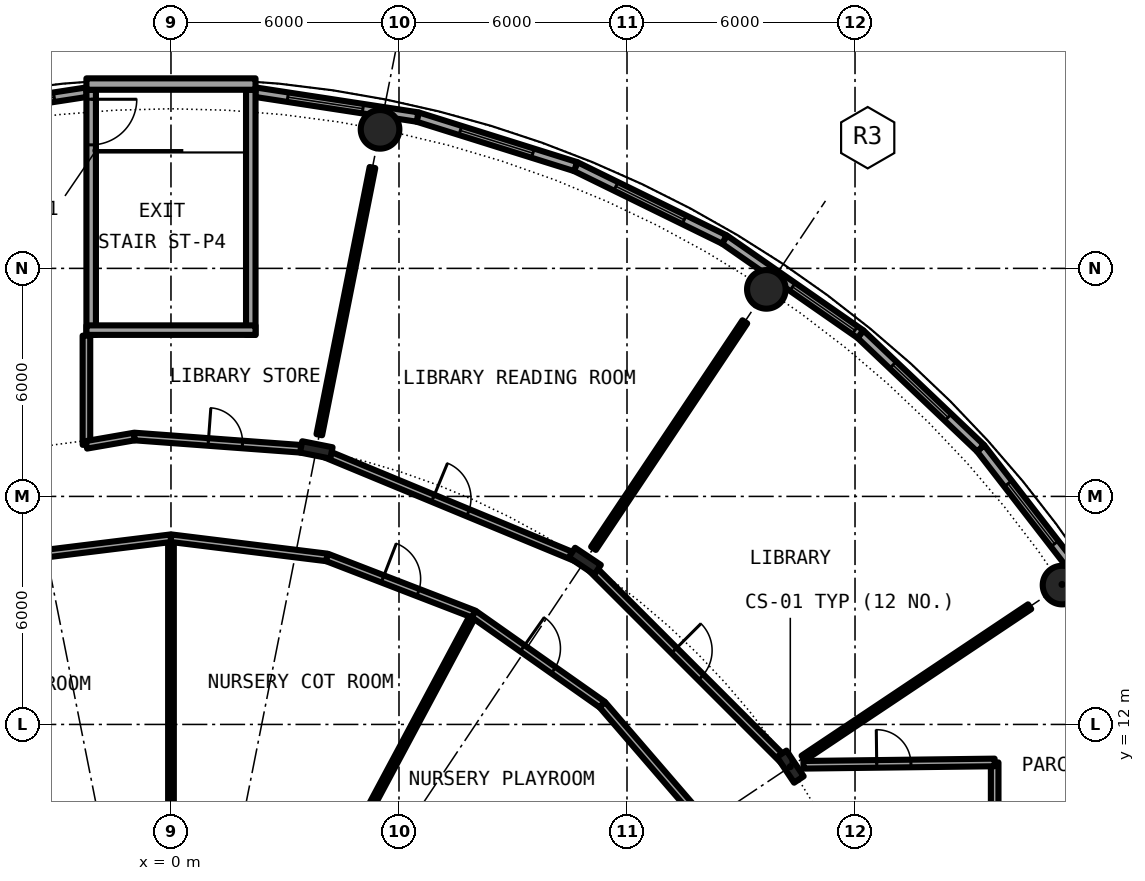
"""IFC4 building model, lengths in metres.
Left out: names, types, materials, properties, quantities, classifications, styles, units other than length and angle.
Written with IfcOpenShell. Run it as: python <this file> out.ifc"""

import sys

from ifc_helpers import new_model, si_unit, direction, frame, frame_2d, origin, origin_2d, place, context, subcontext, project, spatial, rectangle, hollow_circle, i_section, extrude, element, fill, save


model = new_model("IFC4")
c1 = context("Model", 3, precision=1e-05, world=origin(), true_north=direction((0.0, 1.0)))
c2 = subcontext(c1, "Body", "Model", "MODEL_VIEW")
j1 = project(units=[si_unit("LENGTHUNIT", "METRE"), si_unit("PLANEANGLEUNIT", "RADIAN")], contexts=[c1])
p1 = place(None, origin())
s1 = spatial("IfcSite", under=j1, at=p1, CompositionType="ELEMENT")
p2 = place(p1, origin())
s2 = spatial("IfcBuilding", under=s1, at=p2, CompositionType="ELEMENT")
p3 = place(p2, frame((0.0, 0.0, 14.1)))
s3 = spatial("IfcBuildingStorey", under=s2, at=p3, CompositionType="ELEMENT", Elevation=14.1)
for number, where, z_axis, x_axis in (
    (1, (23.448, 15.667, 0.0), (0.0, 0.0, 1.0), (1.0, 0.0, 0.0)),
    (2, (15.667, 23.448, 0.0), (0.0, 0.0, 1.0), (1.0, 0.0, 0.0)),
    (3, (5.501, 27.658, 0.0), (0.0, 0.0, 1.0), (1.0, 0.0, 0.0)),
):
    element("IfcColumn", number, at=place(p3, frame(where, z_axis=z_axis, x_axis=x_axis)), inside=s3, PredefinedType="COLUMN", context=c2, shape_type="SweptSolid", body=[
        extrude(hollow_circle(Radius=0.508, WallThickness=0.05, at=origin_2d()), origin(), (0.0, 0.0, 1.0), 4.2),
    ])
for number, where, z_axis, x_axis in (
    (4, (16.297, 10.889, 0.0), (0.0, 0.0, 1.0), (0.831, 0.556, 0.0)),
    (5, (10.889, 16.297, 0.0), (0.0, 0.0, 1.0), (0.556, 0.831, 0.0)),
    (6, (3.824, 19.223, 0.0), (0.0, 0.0, 1.0), (0.195, 0.981, 0.0)),
):
    element("IfcColumn", number, at=place(p3, frame(where, z_axis=z_axis, x_axis=x_axis)), inside=s3, PredefinedType="COLUMN", context=c2, shape_type="SweptSolid", body=[
        extrude(i_section(OverallWidth=0.303, OverallDepth=0.814, WebThickness=0.021, FlangeThickness=0.04, FilletRadius=0.03, at=origin_2d()), origin(), (0.0, 0.0, 1.0), 4.2),
    ])
p4 = place(p3, frame((23.975, 15.822, 0.0), z_axis=(0.0, 0.0, 1.0), x_axis=(-0.612637256412, 0.790364214812, 0.0)))
e7 = element("IfcWall", 7, at=p4, inside=s3, PredefinedType="SOLIDWALL", context=c2, shape_type="SweptSolid", body=[
    extrude(rectangle(XDim=4.36, YDim=0.25, at=frame_2d((2.18, 0.0))), origin(), (0.0, 0.0, 1.0), 3.8),
])
p5 = place(p4, frame((1.18, 0.0, 0.9)))
e8 = element("IfcOpeningElement", 8, at=p5, cuts=e7, PredefinedType="OPENING", context=c2, shape_type="SweptSolid", body=[
    extrude(rectangle(XDim=2.0, YDim=2.4, at=frame_2d((1.0, 1.2))), frame((0.0, 0.135, 0.0), z_axis=(0.0, -1.0, 0.0), x_axis=(1.0, 0.0, 0.0)), (0.0, 0.0, 1.0), 0.27),
])
p6 = place(p3, frame((21.304, 19.268, 0.0), z_axis=(0.0, 0.0, 1.0), x_axis=(-0.725101501119, 0.68864200647, 0.0)))
e9 = element("IfcWall", 9, at=p6, inside=s3, PredefinedType="SOLIDWALL", context=c2, shape_type="SweptSolid", body=[
    extrude(rectangle(XDim=4.359, YDim=0.25, at=frame_2d((2.18, 0.0))), origin(), (0.0, 0.0, 1.0), 3.8),
])
p7 = place(p6, frame((1.18, 0.0, 0.9)))
e10 = element("IfcOpeningElement", 10, at=p7, cuts=e9, PredefinedType="OPENING", context=c2, shape_type="SweptSolid", body=[
    extrude(rectangle(XDim=2.0, YDim=2.4, at=frame_2d((1.0, 1.2))), frame((0.0, 0.135, 0.0), z_axis=(0.0, -1.0, 0.0), x_axis=(1.0, 0.0, 0.0)), (0.0, 0.0, 1.0), 0.27),
])
p8 = place(p3, frame((18.143, 22.27, 0.0), z_axis=(0.0, 0.0, 1.0), x_axis=(-0.820990800869, 0.57094141984, 0.0)))
e11 = element("IfcWall", 11, at=p8, inside=s3, PredefinedType="SOLIDWALL", context=c2, shape_type="SweptSolid", body=[
    extrude(rectangle(XDim=4.359, YDim=0.25, at=frame_2d((2.18, 0.0))), origin(), (0.0, 0.0, 1.0), 3.8),
])
p9 = place(p8, frame((0.177, 0.0, 0.9)))
e12 = element("IfcOpeningElement", 12, at=p9, cuts=e11, PredefinedType="OPENING", context=c2, shape_type="SweptSolid", body=[
    extrude(rectangle(XDim=2.0, YDim=2.4, at=frame_2d((1.0, 1.2))), frame((0.0, 0.135, 0.0), z_axis=(0.0, -1.0, 0.0), x_axis=(1.0, 0.0, 0.0)), (0.0, 0.0, 1.0), 0.27),
])
p10 = place(p3, frame((14.564, 24.759, 0.0), z_axis=(0.0, 0.0, 1.0), x_axis=(-0.897938079481, 0.440121807478, 0.0)))
e13 = element("IfcWall", 13, at=p10, inside=s3, PredefinedType="SOLIDWALL", context=c2, shape_type="SweptSolid", body=[
    extrude(rectangle(XDim=4.36, YDim=0.25, at=frame_2d((2.18, 0.0))), origin(), (0.0, 0.0, 1.0), 3.8),
])
p11 = place(p10, frame((1.18, 0.0, 0.9)))
e14 = element("IfcOpeningElement", 14, at=p11, cuts=e13, PredefinedType="OPENING", context=c2, shape_type="SweptSolid", body=[
    extrude(rectangle(XDim=2.0, YDim=2.4, at=frame_2d((1.0, 1.2))), frame((0.0, 0.135, 0.0), z_axis=(0.0, -1.0, 0.0), x_axis=(1.0, 0.0, 0.0)), (0.0, 0.0, 1.0), 0.27),
])
p12 = place(p3, frame((10.649, 26.678, 0.0), z_axis=(0.0, 0.0, 1.0), x_axis=(-0.954219534331, 0.299107138498, 0.0)))
e15 = element("IfcWall", 15, at=p12, inside=s3, PredefinedType="SOLIDWALL", context=c2, shape_type="SweptSolid", body=[
    extrude(rectangle(XDim=4.359, YDim=0.25, at=frame_2d((2.18, 0.0))), origin(), (0.0, 0.0, 1.0), 3.8),
])
p13 = place(p12, frame((1.18, 0.0, 0.9)))
e16 = element("IfcOpeningElement", 16, at=p13, cuts=e15, PredefinedType="OPENING", context=c2, shape_type="SweptSolid", body=[
    extrude(rectangle(XDim=2.0, YDim=2.4, at=frame_2d((1.0, 1.2))), frame((0.0, 0.135, 0.0), z_axis=(0.0, -1.0, 0.0), x_axis=(1.0, 0.0, 0.0)), (0.0, 0.0, 1.0), 0.27),
])
p14 = place(p3, frame((6.489, 27.982, 0.0), z_axis=(0.0, 0.0, 1.0), x_axis=(-0.988472895049, 0.151397938406, 0.0)))
e17 = element("IfcWall", 17, at=p14, inside=s3, PredefinedType="SOLIDWALL", context=c2, shape_type="SweptSolid", body=[
    extrude(rectangle(XDim=4.314, YDim=0.25, at=frame_2d((2.157, 0.0))), origin(), (0.0, 0.0, 1.0), 3.8),
])
p15 = place(p14, frame((1.455, 0.0, 0.9)))
e18 = element("IfcOpeningElement", 18, at=p15, cuts=e17, PredefinedType="OPENING", context=c2, shape_type="SweptSolid", body=[
    extrude(rectangle(XDim=2.0, YDim=2.4, at=frame_2d((1.0, 1.2))), frame((0.0, 0.135, 0.0), z_axis=(0.0, -1.0, 0.0), x_axis=(1.0, 0.0, 0.0)), (0.0, 0.0, 1.0), 0.27),
])
p16 = place(p3, frame((-2.225, 28.635, 0.0), z_axis=(0.0, 0.0, 1.0), x_axis=(-0.988472895049, -0.151397938406, 0.0)))
e19 = element("IfcWall", 19, at=p16, inside=s3, PredefinedType="SOLIDWALL", context=c2, shape_type="SweptSolid", body=[
    extrude(rectangle(XDim=4.314, YDim=0.25, at=frame_2d((2.157, 0.0))), origin(), (0.0, 0.0, 1.0), 3.8),
])
p17 = place(p16, frame((0.859, 0.0, 0.9)))
e20 = element("IfcOpeningElement", 20, at=p17, cuts=e19, PredefinedType="OPENING", context=c2, shape_type="SweptSolid", body=[
    extrude(rectangle(XDim=2.0, YDim=2.4, at=frame_2d((1.0, 1.2))), frame((0.0, 0.135, 0.0), z_axis=(0.0, -1.0, 0.0), x_axis=(1.0, 0.0, 0.0)), (0.0, 0.0, 1.0), 0.27),
])
p18 = place(p3, frame((-2.1, 28.7, 0.0), z_axis=(0.0, 0.0, 1.0), x_axis=(0.0, -1.0, 0.0)))
e21 = element("IfcWall", 21, at=p18, inside=s3, PredefinedType="SHEAR", context=c2, shape_type="SweptSolid", body=[
    extrude(rectangle(XDim=6.45, YDim=0.25, at=frame_2d((3.225, 0.0))), origin(), (0.0, 0.0, 1.0), 4.2),
])
p19 = place(p18, frame((0.25, 0.0, 0.0)))
e22 = element("IfcOpeningElement", 22, at=p19, cuts=e21, PredefinedType="OPENING", context=c2, shape_type="SweptSolid", body=[
    extrude(rectangle(XDim=1.2, YDim=2.3, at=frame_2d((0.6, 1.15))), frame((0.0, 0.135, 0.0), z_axis=(0.0, -1.0, 0.0), x_axis=(1.0, 0.0, 0.0)), (0.0, 0.0, 1.0), 0.27),
])
p20 = place(p3, frame((2.1, 22.25, 0.0), z_axis=(0.0, 0.0, 1.0), x_axis=(0.0, 1.0, 0.0)))
e23 = element("IfcWall", 23, at=p20, inside=s3, PredefinedType="SHEAR", context=c2, shape_type="SweptSolid", body=[
    extrude(rectangle(XDim=6.45, YDim=0.25, at=frame_2d((3.225, 0.0))), origin(), (0.0, 0.0, 1.0), 4.2),
])
p21 = place(p3, frame((2.225, 22.375, 0.0), z_axis=(0.0, 0.0, 1.0), x_axis=(-1.0, 0.0, 0.0)))
e24 = element("IfcWall", 24, at=p21, inside=s3, PredefinedType="SHEAR", context=c2, shape_type="SweptSolid", body=[
    extrude(rectangle(XDim=4.45, YDim=0.25, at=frame_2d((2.225, 0.0))), origin(), (0.0, 0.0, 1.0), 4.2),
])
p22 = place(p3, frame((2.225, 28.85, 0.0), z_axis=(0.0, 0.0, 1.0), x_axis=(-1.0, 0.0, 0.0)))
e25 = element("IfcWall", 25, at=p22, inside=s3, PredefinedType="SHEAR", context=c2, shape_type="SweptSolid", body=[
    extrude(rectangle(XDim=4.45, YDim=0.3, at=frame_2d((2.225, 0.0))), origin(), (0.0, 0.0, 1.0), 4.2),
])
p23 = place(p3, frame((21.675, 9.4, 0.0), z_axis=(0.0, 0.0, 1.0), x_axis=(0.0, 1.0, 0.0)))
e26 = element("IfcWall", 26, at=p23, inside=s3, PredefinedType="PARTITIONING", context=c2, shape_type="SweptSolid", body=[
    extrude(rectangle(XDim=1.6, YDim=0.2, at=frame_2d((0.8, 0.0))), origin(), (0.0, 0.0, 1.0), 3.8),
])
p24 = place(p3, frame((0.0, 7.72, 0.0), z_axis=(0.0, 0.0, 1.0), x_axis=(0.0, 1.0, 0.0)))
e27 = element("IfcWall", 27, at=p24, inside=s3, PredefinedType="PARTITIONING", context=c2, shape_type="SweptSolid", body=[
    extrude(rectangle(XDim=9.18, YDim=0.15, at=frame_2d((4.59, 0.0))), origin(), (0.0, 0.0, 1.0), 3.8),
])
p25 = place(p3, frame((3.64, 6.808, 0.0), z_axis=(0.0, 0.0, 1.0), x_axis=(0.471460365694, 0.881887251059, 0.0)))
e28 = element("IfcWall", 28, at=p25, inside=s3, PredefinedType="PARTITIONING", context=c2, shape_type="SweptSolid", body=[
    extrude(rectangle(XDim=9.18, YDim=0.15, at=frame_2d((4.59, 0.0))), origin(), (0.0, 0.0, 1.0), 3.8),
])
p26 = place(p3, frame((3.903, 19.623, 0.0), z_axis=(0.0, 0.0, 1.0), x_axis=(0.195166281073, 0.98077016815, 0.0)))
e29 = element("IfcWall", 29, at=p26, inside=s3, PredefinedType="PARTITIONING", context=c2, shape_type="SweptSolid", body=[
    extrude(rectangle(XDim=7.168, YDim=0.15, at=frame_2d((3.584, 0.0))), origin(), (0.0, 0.0, 1.0), 3.8),
])
p27 = place(p3, frame((11.118, 16.633, 0.0), z_axis=(0.0, 0.0, 1.0), x_axis=(0.555650828752, 0.831415754305, 0.0)))
e30 = element("IfcWall", 30, at=p27, inside=s3, PredefinedType="PARTITIONING", context=c2, shape_type="SweptSolid", body=[
    extrude(rectangle(XDim=7.168, YDim=0.15, at=frame_2d((3.584, 0.0))), origin(), (0.0, 0.0, 1.0), 3.8),
])
p28 = place(p3, frame((16.635, 11.115, 0.0), z_axis=(0.0, 0.0, 1.0), x_axis=(0.831431488123, 0.555627285648, 0.0)))
e31 = element("IfcWall", 31, at=p28, inside=s3, PredefinedType="PARTITIONING", context=c2, shape_type="SweptSolid", body=[
    extrude(rectangle(XDim=7.168, YDim=0.15, at=frame_2d((3.584, 0.0))), origin(), (0.0, 0.0, 1.0), 3.8),
])
p29 = place(p3, frame((-2.225, 19.357, 0.0), z_axis=(0.0, 0.0, 1.0), x_axis=(0.0, 1.0, 0.0)))
e32 = element("IfcWall", 32, at=p29, inside=s3, PredefinedType="PARTITIONING", context=c2, shape_type="SweptSolid", body=[
    extrude(rectangle(XDim=2.873, YDim=0.2, at=frame_2d((1.437, 0.0))), origin(), (0.0, 0.0, 1.0), 3.8),
])
p30 = place(p3, frame((16.643, 10.938, 0.0), z_axis=(0.0, 0.0, 1.0), x_axis=(0.999924074118, 0.012322580895, 0.0)))
e33 = element("IfcWall", 33, at=p30, inside=s3, PredefinedType="PARTITIONING", context=c2, shape_type="SweptSolid", body=[
    extrude(rectangle(XDim=5.032, YDim=0.2, at=frame_2d((2.516, 0.0))), origin(), (0.0, 0.0, 1.0), 3.8),
])
p31 = place(p30, frame((1.928, 0.0, 0.0)))
e34 = element("IfcOpeningElement", 34, at=p31, cuts=e33, PredefinedType="OPENING", context=c2, shape_type="SweptSolid", body=[
    extrude(rectangle(XDim=0.9, YDim=2.3, at=frame_2d((0.45, 1.15))), frame((0.0, 0.11, 0.0), z_axis=(0.0, -1.0, 0.0), x_axis=(1.0, 0.0, 0.0)), (0.0, 0.0, 1.0), 0.22),
])
for number, where, z_axis, x_axis in (
    (35, (-4.106, 16.394, 0.0), (0.0, 0.0, 1.0), (0.992, 0.122, 0.0)),
    (36, (0.0, 16.9, 0.0), (0.0, 0.0, 1.0), (0.992, -0.122, 0.0)),
):
    element("IfcWall", number, at=place(p3, frame(where, z_axis=z_axis, x_axis=x_axis)), inside=s3, PredefinedType="PARTITIONING", context=c2, shape_type="SweptSolid", body=[
        extrude(rectangle(XDim=4.137, YDim=0.2, at=frame_2d((2.068, 0.0))), origin(), (0.0, 0.0, 1.0), 3.8),
    ])
p32 = place(p3, frame((4.106, 16.394, 0.0), z_axis=(0.0, 0.0, 1.0), x_axis=(0.932943640288, -0.360022449363, 0.0)))
e37 = element("IfcWall", 37, at=p32, inside=s3, PredefinedType="PARTITIONING", context=c2, shape_type="SweptSolid", body=[
    extrude(rectangle(XDim=4.139, YDim=0.2, at=frame_2d((2.069, 0.0))), origin(), (0.0, 0.0, 1.0), 3.8),
])
p33 = place(p32, frame((1.569, 0.0, 0.0)))
e38 = element("IfcOpeningElement", 38, at=p33, cuts=e37, PredefinedType="OPENING", context=c2, shape_type="SweptSolid", body=[
    extrude(rectangle(XDim=1.0, YDim=2.3, at=frame_2d((0.5, 1.15))), frame((0.0, 0.11, 0.0), z_axis=(0.0, -1.0, 0.0), x_axis=(1.0, 0.0, 0.0)), (0.0, 0.0, 1.0), 0.22),
])
p34 = place(p3, frame((7.967, 14.904, 0.0), z_axis=(0.0, 0.0, 1.0), x_axis=(0.817567680547, -0.575832517079, 0.0)))
e39 = element("IfcWall", 39, at=p34, inside=s3, PredefinedType="PARTITIONING", context=c2, shape_type="SweptSolid", body=[
    extrude(rectangle(XDim=4.137, YDim=0.2, at=frame_2d((2.068, 0.0))), origin(), (0.0, 0.0, 1.0), 3.8),
])
p35 = place(p34, frame((1.568, 0.0, 0.0)))
e40 = element("IfcOpeningElement", 40, at=p35, cuts=e39, PredefinedType="OPENING", context=c2, shape_type="SweptSolid", body=[
    extrude(rectangle(XDim=1.0, YDim=2.3, at=frame_2d((0.5, 1.15))), frame((0.0, 0.11, 0.0), z_axis=(0.0, -1.0, 0.0), x_axis=(1.0, 0.0, 0.0)), (0.0, 0.0, 1.0), 0.22),
])
p36 = place(p3, frame((11.349, 12.522, 0.0), z_axis=(0.0, 0.0, 1.0), x_axis=(0.653274518104, -0.757121129012, 0.0)))
e41 = element("IfcWall", 41, at=p36, inside=s3, PredefinedType="PARTITIONING", context=c2, shape_type="SweptSolid", body=[
    extrude(rectangle(XDim=4.124, YDim=0.2, at=frame_2d((2.062, 0.0))), origin(), (0.0, 0.0, 1.0), 3.8),
])
p37 = place(p3, frame((3.966, 19.164, 0.0), z_axis=(0.0, 0.0, 1.0), x_axis=(0.923912243701, -0.382604451019, 0.0)))
e42 = element("IfcWall", 42, at=p37, inside=s3, PredefinedType="PARTITIONING", context=c2, shape_type="SweptSolid", body=[
    extrude(rectangle(XDim=7.339, YDim=0.2, at=frame_2d((3.67, 0.0))), origin(), (0.0, 0.0, 1.0), 3.38),
])
p38 = place(p37, frame((3.17, 0.0, 0.0)))
e43 = element("IfcOpeningElement", 43, at=p38, cuts=e42, PredefinedType="OPENING", context=c2, shape_type="SweptSolid", body=[
    extrude(rectangle(XDim=1.0, YDim=2.3, at=frame_2d((0.5, 1.15))), frame((0.0, 0.11, 0.0), z_axis=(0.0, -1.0, 0.0), x_axis=(1.0, 0.0, 0.0)), (0.0, 0.0, 1.0), 0.22),
])
p39 = place(p3, frame((10.998, 16.188, 0.0), z_axis=(0.0, 0.0, 1.0), x_axis=(0.707106781187, -0.707106781187, 0.0)))
e44 = element("IfcWall", 44, at=p39, inside=s3, PredefinedType="PARTITIONING", context=c2, shape_type="SweptSolid", body=[
    extrude(rectangle(XDim=7.34, YDim=0.2, at=frame_2d((3.67, 0.0))), origin(), (0.0, 0.0, 1.0), 3.38),
])
p40 = place(p39, frame((3.17, 0.0, 0.0)))
e45 = element("IfcOpeningElement", 45, at=p40, cuts=e44, PredefinedType="OPENING", context=c2, shape_type="SweptSolid", body=[
    extrude(rectangle(XDim=1.0, YDim=2.3, at=frame_2d((0.5, 1.15))), frame((0.0, 0.11, 0.0), z_axis=(0.0, -1.0, 0.0), x_axis=(1.0, 0.0, 0.0)), (0.0, 0.0, 1.0), 0.22),
])
p41 = place(p3, frame((-2.225, 19.357, 0.0), z_axis=(0.0, 0.0, 1.0), x_axis=(0.985302465297, 0.170818769109, 0.0)))
e46 = element("IfcWall", 46, at=p41, inside=s3, PredefinedType="PARTITIONING", context=c2, shape_type="SweptSolid", body=[
    extrude(rectangle(XDim=1.282, YDim=0.2, at=frame_2d((0.641, 0.0))), origin(), (0.0, 0.0, 1.0), 3.38),
])
p42 = place(p3, frame((-0.962, 19.576, 0.0), z_axis=(0.0, 0.0, 1.0), x_axis=(0.997285649759, -0.073629700427, 0.0)))
e47 = element("IfcWall", 47, at=p42, inside=s3, PredefinedType="PARTITIONING", context=c2, shape_type="SweptSolid", body=[
    extrude(rectangle(XDim=4.646, YDim=0.2, at=frame_2d((2.323, 0.0))), origin(), (0.0, 0.0, 1.0), 3.38),
])
p43 = place(p42, frame((1.95, 0.0, 0.0)))
e48 = element("IfcOpeningElement", 48, at=p43, cuts=e47, PredefinedType="OPENING", context=c2, shape_type="SweptSolid", body=[
    extrude(rectangle(XDim=0.9, YDim=2.3, at=frame_2d((0.45, 1.15))), frame((0.0, 0.11, 0.0), z_axis=(0.0, -1.0, 0.0), x_axis=(1.0, 0.0, 0.0)), (0.0, 0.0, 1.0), 0.22),
])
p44 = place(p5, origin())
e49 = element("IfcWindow", 49, at=p44, inside=s3, PartitioningType="SINGLE_PANEL", PredefinedType="WINDOW", context=c2, shape_type="SweptSolid", body=[
    extrude(rectangle(XDim=2.0, YDim=2.4, at=frame_2d((1.0, 1.2))), frame((0.0, 0.03, 0.0), z_axis=(0.0, -1.0, 0.0), x_axis=(1.0, 0.0, 0.0)), (0.0, 0.0, 1.0), 0.06),
])
fill(e8, e49)
p45 = place(p7, origin())
e50 = element("IfcWindow", 50, at=p45, inside=s3, PartitioningType="SINGLE_PANEL", PredefinedType="WINDOW", context=c2, shape_type="SweptSolid", body=[
    extrude(rectangle(XDim=2.0, YDim=2.4, at=frame_2d((1.0, 1.2))), frame((0.0, 0.03, 0.0), z_axis=(0.0, -1.0, 0.0), x_axis=(1.0, 0.0, 0.0)), (0.0, 0.0, 1.0), 0.06),
])
fill(e10, e50)
p46 = place(p9, origin())
e51 = element("IfcWindow", 51, at=p46, inside=s3, PartitioningType="SINGLE_PANEL", PredefinedType="WINDOW", context=c2, shape_type="SweptSolid", body=[
    extrude(rectangle(XDim=2.0, YDim=2.4, at=frame_2d((1.0, 1.2))), frame((0.0, 0.03, 0.0), z_axis=(0.0, -1.0, 0.0), x_axis=(1.0, 0.0, 0.0)), (0.0, 0.0, 1.0), 0.06),
])
fill(e12, e51)
p47 = place(p11, origin())
e52 = element("IfcWindow", 52, at=p47, inside=s3, PartitioningType="SINGLE_PANEL", PredefinedType="WINDOW", context=c2, shape_type="SweptSolid", body=[
    extrude(rectangle(XDim=2.0, YDim=2.4, at=frame_2d((1.0, 1.2))), frame((0.0, 0.03, 0.0), z_axis=(0.0, -1.0, 0.0), x_axis=(1.0, 0.0, 0.0)), (0.0, 0.0, 1.0), 0.06),
])
fill(e14, e52)
p48 = place(p13, origin())
e53 = element("IfcWindow", 53, at=p48, inside=s3, PartitioningType="SINGLE_PANEL", PredefinedType="WINDOW", context=c2, shape_type="SweptSolid", body=[
    extrude(rectangle(XDim=2.0, YDim=2.4, at=frame_2d((1.0, 1.2))), frame((0.0, 0.03, 0.0), z_axis=(0.0, -1.0, 0.0), x_axis=(1.0, 0.0, 0.0)), (0.0, 0.0, 1.0), 0.06),
])
fill(e16, e53)
p49 = place(p15, origin())
e54 = element("IfcWindow", 54, at=p49, inside=s3, PartitioningType="SINGLE_PANEL", PredefinedType="WINDOW", context=c2, shape_type="SweptSolid", body=[
    extrude(rectangle(XDim=2.0, YDim=2.4, at=frame_2d((1.0, 1.2))), frame((0.0, 0.03, 0.0), z_axis=(0.0, -1.0, 0.0), x_axis=(1.0, 0.0, 0.0)), (0.0, 0.0, 1.0), 0.06),
])
fill(e18, e54)
p50 = place(p17, origin())
e55 = element("IfcWindow", 55, at=p50, inside=s3, PartitioningType="SINGLE_PANEL", PredefinedType="WINDOW", context=c2, shape_type="SweptSolid", body=[
    extrude(rectangle(XDim=2.0, YDim=2.4, at=frame_2d((1.0, 1.2))), frame((0.0, 0.03, 0.0), z_axis=(0.0, -1.0, 0.0), x_axis=(1.0, 0.0, 0.0)), (0.0, 0.0, 1.0), 0.06),
])
fill(e20, e55)
p51 = place(p19, origin())
e56 = element("IfcDoor", 56, at=p51, inside=s3, OperationType="SINGLE_SWING_RIGHT", PredefinedType="DOOR", context=c2, shape_type="SweptSolid", body=[
    extrude(rectangle(XDim=1.2, YDim=2.3, at=frame_2d((0.6, 1.15))), frame((0.0, 0.025, 0.0), z_axis=(0.0, -1.0, 0.0), x_axis=(1.0, 0.0, 0.0)), (0.0, 0.0, 1.0), 0.05),
])
fill(e22, e56)
p52 = place(p40, origin())
e57 = element("IfcDoor", 57, at=p52, inside=s3, OperationType="SINGLE_SWING_RIGHT", PredefinedType="DOOR", context=c2, shape_type="SweptSolid", body=[
    extrude(rectangle(XDim=1.0, YDim=2.3, at=frame_2d((0.5, 1.15))), frame((0.0, 0.025, 0.0), z_axis=(0.0, -1.0, 0.0), x_axis=(1.0, 0.0, 0.0)), (0.0, 0.0, 1.0), 0.05),
])
fill(e45, e57)
p53 = place(p38, origin())
e58 = element("IfcDoor", 58, at=p53, inside=s3, OperationType="SINGLE_SWING_RIGHT", PredefinedType="DOOR", context=c2, shape_type="SweptSolid", body=[
    extrude(rectangle(XDim=1.0, YDim=2.3, at=frame_2d((0.5, 1.15))), frame((0.0, 0.025, 0.0), z_axis=(0.0, -1.0, 0.0), x_axis=(1.0, 0.0, 0.0)), (0.0, 0.0, 1.0), 0.05),
])
fill(e43, e58)
p54 = place(p43, origin())
e59 = element("IfcDoor", 59, at=p54, inside=s3, OperationType="SINGLE_SWING_RIGHT", PredefinedType="DOOR", context=c2, shape_type="SweptSolid", body=[
    extrude(rectangle(XDim=0.9, YDim=2.3, at=frame_2d((0.45, 1.15))), frame((0.0, 0.025, 0.0), z_axis=(0.0, -1.0, 0.0), x_axis=(1.0, 0.0, 0.0)), (0.0, 0.0, 1.0), 0.05),
])
fill(e48, e59)
p55 = place(p35, origin())
e60 = element("IfcDoor", 60, at=p55, inside=s3, OperationType="SINGLE_SWING_LEFT", PredefinedType="DOOR", context=c2, shape_type="SweptSolid", body=[
    extrude(rectangle(XDim=1.0, YDim=2.3, at=frame_2d((0.5, 1.15))), frame((0.0, 0.025, 0.0), z_axis=(0.0, -1.0, 0.0), x_axis=(1.0, 0.0, 0.0)), (0.0, 0.0, 1.0), 0.05),
])
fill(e40, e60)
p56 = place(p33, origin())
e61 = element("IfcDoor", 61, at=p56, inside=s3, OperationType="SINGLE_SWING_LEFT", PredefinedType="DOOR", context=c2, shape_type="SweptSolid", body=[
    extrude(rectangle(XDim=1.0, YDim=2.3, at=frame_2d((0.5, 1.15))), frame((0.0, 0.025, 0.0), z_axis=(0.0, -1.0, 0.0), x_axis=(1.0, 0.0, 0.0)), (0.0, 0.0, 1.0), 0.05),
])
fill(e38, e61)
p57 = place(p31, origin())
e62 = element("IfcDoor", 62, at=p57, inside=s3, OperationType="SINGLE_SWING_LEFT", PredefinedType="DOOR", context=c2, shape_type="SweptSolid", body=[
    extrude(rectangle(XDim=0.9, YDim=2.3, at=frame_2d((0.45, 1.15))), frame((0.0, 0.025, 0.0), z_axis=(0.0, -1.0, 0.0), x_axis=(1.0, 0.0, 0.0)), (0.0, 0.0, 1.0), 0.05),
])
fill(e34, e62)
save(model, sys.argv[1])
